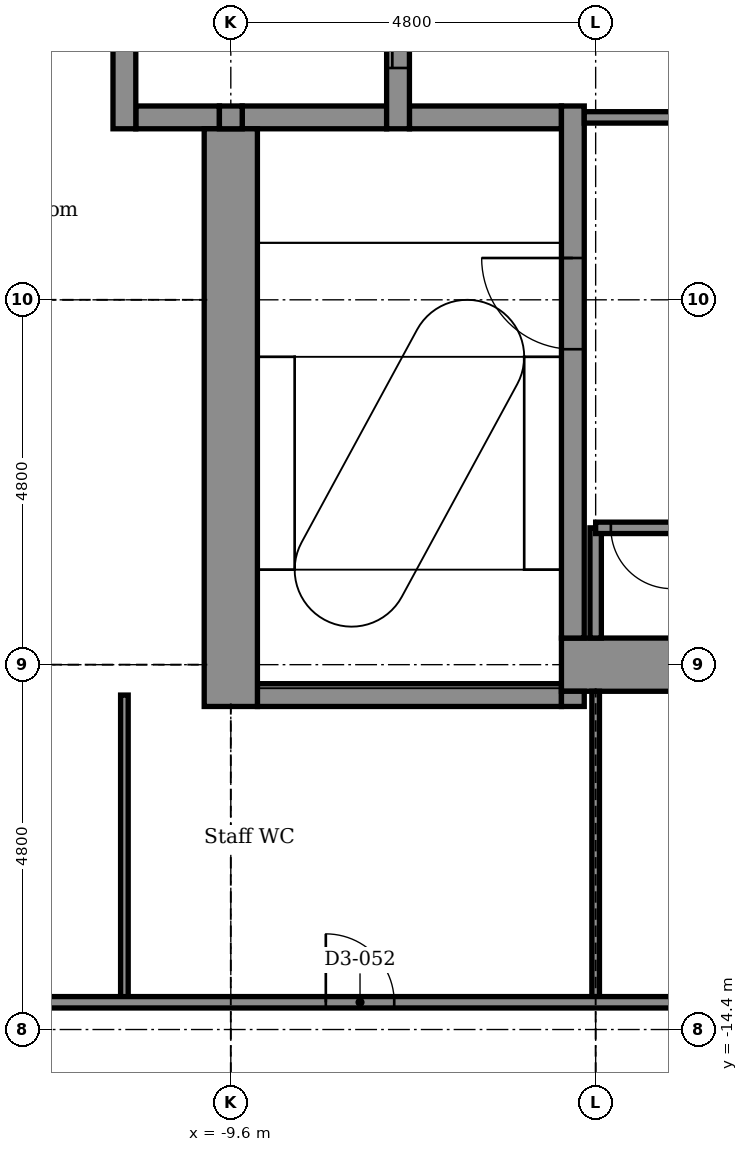
"""IFC4 building model, lengths in metres.
Left out: names, types, materials, properties, quantities, classifications, styles, units other than length and angle.
Written with IfcOpenShell. Run it as: python <this file> out.ifc"""

import sys

from ifc_helpers import new_model, si_unit, direction, frame, frame_2d, origin, place, context, subcontext, project, spatial, rectangle, extrude, element, fill, save


model = new_model("IFC4")
c1 = context("Model", 3, precision=1e-05, world=origin(), true_north=direction((0.0, 1.0)))
c2 = subcontext(c1, "Body", "Model", "MODEL_VIEW")
j1 = project(units=[si_unit("LENGTHUNIT", "METRE"), si_unit("PLANEANGLEUNIT", "RADIAN")], contexts=[c1])
p1 = place(None, origin())
s1 = spatial("IfcSite", under=j1, at=p1, CompositionType="ELEMENT")
p2 = place(p1, origin())
s2 = spatial("IfcBuilding", under=s1, at=p2, CompositionType="ELEMENT")
p3 = place(p2, frame((0.0, 0.0, 170.0)))
s3 = spatial("IfcBuildingStorey", under=s2, at=p3, CompositionType="ELEMENT", Elevation=170.0)
p4 = place(p3, frame((-9.25, -10.0, -0.15), z_axis=(0.0, 0.0, 1.0), x_axis=(1.0, 0.0, 0.0)))
e1 = element("IfcWall", 1, at=p4, inside=s3, PredefinedType="STANDARD", context=c2, shape_type="SweptSolid", body=[
    extrude(rectangle(XDim=4.0, YDim=0.3, at=frame_2d((2.0, 0.0))), origin(), (0.0, 0.0, 1.0), 3.9),
])
p5 = place(p3, frame((-5.25, -9.6, -0.15), z_axis=(0.0, 0.0, 1.0), x_axis=(1.0, 0.0, 0.0)))
e2 = element("IfcWall", 2, at=p5, inside=s3, PredefinedType="SHEAR", context=c2, shape_type="SweptSolid", body=[
    extrude(rectangle(XDim=10.2, YDim=0.7, at=frame_2d((5.1, 0.0))), origin(), (0.0, 0.0, 1.0), 3.9),
])
p6 = place(p5, frame((9.0, 0.0, 0.15)))
e3 = element("IfcOpeningElement", 3, at=p6, cuts=e2, PredefinedType="OPENING", context=c2, shape_type="SweptSolid", body=[
    extrude(rectangle(XDim=0.9, YDim=2.1, at=frame_2d((0.45, 1.05))), frame((0.0, 0.36, 0.0), z_axis=(0.0, -1.0, 0.0), x_axis=(1.0, 0.0, 0.0)), (0.0, 0.0, 1.0), 0.72),
])
p7 = place(p3, frame((-10.85, -2.4, -0.15), z_axis=(0.0, 0.0, 1.0), x_axis=(1.0, 0.0, 0.0)))
e4 = element("IfcWall", 4, at=p7, inside=s3, PredefinedType="STANDARD", context=c2, shape_type="SweptSolid", body=[
    extrude(rectangle(XDim=1.1, YDim=0.3, at=frame_2d((0.55, 0.0))), origin(), (0.0, 0.0, 1.0), 3.9),
])
p8 = place(p3, frame((-9.45, -2.4, -0.15), z_axis=(0.0, 0.0, 1.0), x_axis=(1.0, 0.0, 0.0)))
e5 = element("IfcWall", 5, at=p8, inside=s3, PredefinedType="STANDARD", context=c2, shape_type="SweptSolid", body=[
    extrude(rectangle(XDim=1.9, YDim=0.3, at=frame_2d((0.95, 0.0))), origin(), (0.0, 0.0, 1.0), 3.9),
])
p9 = place(p3, frame((-7.25, -2.4, -0.15), z_axis=(0.0, 0.0, 1.0), x_axis=(1.0, 0.0, 0.0)))
e6 = element("IfcWall", 6, at=p9, inside=s3, PredefinedType="STANDARD", context=c2, shape_type="SweptSolid", body=[
    extrude(rectangle(XDim=2.0, YDim=0.3, at=frame_2d((1.0, 0.0))), origin(), (0.0, 0.0, 1.0), 3.9),
])
p10 = place(p3, frame((-11.0, -2.55, -0.15), z_axis=(0.0, 0.0, 1.0), x_axis=(0.0, 1.0, 0.0)))
e7 = element("IfcWall", 7, at=p10, inside=s3, PredefinedType="STANDARD", context=c2, shape_type="SweptSolid", body=[
    extrude(rectangle(XDim=5.1, YDim=0.3, at=frame_2d((2.55, 0.0))), origin(), (0.0, 0.0, 1.0), 3.9),
])
p11 = place(p3, frame((-9.6, -10.15, -0.15), z_axis=(0.0, 0.0, 1.0), x_axis=(0.0, 1.0, 0.0)))
e8 = element("IfcWall", 8, at=p11, inside=s3, PredefinedType="SHEAR", context=c2, shape_type="SweptSolid", body=[
    extrude(rectangle(XDim=7.6, YDim=0.7, at=frame_2d((3.8, 0.0))), origin(), (0.0, 0.0, 1.0), 3.9),
])
p12 = place(p3, frame((-9.6, -2.55, -0.15), z_axis=(0.0, 0.0, 1.0), x_axis=(0.0, 1.0, 0.0)))
e9 = element("IfcWall", 9, at=p12, inside=s3, PredefinedType="STANDARD", context=c2, shape_type="SweptSolid", body=[
    extrude(rectangle(XDim=0.3, YDim=0.3, at=frame_2d((0.15, 0.0))), origin(), (0.0, 0.0, 1.0), 3.9),
])
p13 = place(p3, frame((-7.4, -2.55, -0.15), z_axis=(0.0, 0.0, 1.0), x_axis=(0.0, 1.0, 0.0)))
e10 = element("IfcWall", 10, at=p13, inside=s3, PredefinedType="STANDARD", context=c2, shape_type="SweptSolid", body=[
    extrude(rectangle(XDim=5.1, YDim=0.3, at=frame_2d((2.55, 0.0))), origin(), (0.0, 0.0, 1.0), 3.9),
])
p14 = place(p13, frame((0.8, 0.0, 0.15)))
e11 = element("IfcOpeningElement", 11, at=p14, cuts=e10, PredefinedType="OPENING", context=c2, shape_type="SweptSolid", body=[
    extrude(rectangle(XDim=1.1, YDim=2.1, at=frame_2d((0.55, 1.05))), frame((0.0, 0.16, 0.0), z_axis=(0.0, -1.0, 0.0), x_axis=(1.0, 0.0, 0.0)), (0.0, 0.0, 1.0), 0.32),
])
p15 = place(p13, frame((3.2, 0.0, 0.15)))
e12 = element("IfcOpeningElement", 12, at=p15, cuts=e10, PredefinedType="OPENING", context=c2, shape_type="SweptSolid", body=[
    extrude(rectangle(XDim=1.1, YDim=2.1, at=frame_2d((0.55, 1.05))), frame((0.0, 0.16, 0.0), z_axis=(0.0, -1.0, 0.0), x_axis=(1.0, 0.0, 0.0)), (0.0, 0.0, 1.0), 0.32),
])
p16 = place(p3, frame((-5.1, -10.15, -0.15), z_axis=(0.0, 0.0, 1.0), x_axis=(0.0, 1.0, 0.0)))
e13 = element("IfcWall", 13, at=p16, inside=s3, PredefinedType="STANDARD", context=c2, shape_type="SweptSolid", body=[
    extrude(rectangle(XDim=0.2, YDim=0.3, at=frame_2d((0.1, 0.0))), origin(), (0.0, 0.0, 1.0), 3.9),
])
p17 = place(p3, frame((-5.1, -9.25, -0.15), z_axis=(0.0, 0.0, 1.0), x_axis=(0.0, 1.0, 0.0)))
e14 = element("IfcWall", 14, at=p17, inside=s3, PredefinedType="STANDARD", context=c2, shape_type="SweptSolid", body=[
    extrude(rectangle(XDim=7.0, YDim=0.3, at=frame_2d((3.5, 0.0))), origin(), (0.0, 0.0, 1.0), 3.9),
])
p18 = place(p17, frame((3.8, 0.0, 0.15)))
e15 = element("IfcOpeningElement", 15, at=p18, cuts=e14, PredefinedType="OPENING", context=c2, shape_type="SweptSolid", body=[
    extrude(rectangle(XDim=1.2, YDim=2.1, at=frame_2d((0.6, 1.05))), frame((0.0, 0.16, 0.0), z_axis=(0.0, -1.0, 0.0), x_axis=(1.0, 0.0, 0.0)), (0.0, 0.0, 1.0), 0.32),
])
p19 = place(p3, frame((-4.8, -14.042, 0.0), z_axis=(0.0, 0.0, 1.0), x_axis=(0.0, 1.0, 0.0)))
e16 = element("IfcWall", 16, at=p19, inside=s3, PredefinedType="PARTITIONING", context=c2, shape_type="SweptSolid", body=[
    extrude(rectangle(XDim=4.092, YDim=0.1, at=frame_2d((2.046, 0.0))), origin(), (0.0, 0.0, 1.0), 3.066),
])
p20 = place(p3, frame((-4.8, -9.25, 0.0), z_axis=(0.0, 0.0, 1.0), x_axis=(0.0, 1.0, 0.0)))
e17 = element("IfcWall", 17, at=p20, inside=s3, PredefinedType="PARTITIONING", context=c2, shape_type="SweptSolid", body=[
    extrude(rectangle(XDim=1.45, YDim=0.15, at=frame_2d((0.725, 0.0))), origin(), (0.0, 0.0, 1.0), 3.75),
])
p21 = place(p3, frame((-11.0, -14.042, 0.0), z_axis=(0.0, 0.0, 1.0), x_axis=(0.0, 1.0, 0.0)))
e18 = element("IfcWall", 18, at=p21, inside=s3, PredefinedType="PARTITIONING", context=c2, shape_type="SweptSolid", body=[
    extrude(rectangle(XDim=4.042, YDim=0.1, at=frame_2d((2.021, 0.0))), origin(), (0.0, 0.0, 1.0), 3.75),
])
p22 = place(p3, frame((-17.021, -14.042, 0.0), z_axis=(0.0, 0.0, 1.0), x_axis=(1.0, 0.0, 0.0)))
e19 = element("IfcWall", 19, at=p22, inside=s3, PredefinedType="PARTITIONING", context=c2, shape_type="SweptSolid", body=[
    extrude(rectangle(XDim=20.621, YDim=0.15, at=frame_2d((10.311, 0.0))), origin(), (0.0, 0.0, 1.0), 3.75),
])
p23 = place(p22, frame((8.671, 0.0, 0.0)))
e20 = element("IfcOpeningElement", 20, at=p23, cuts=e19, PredefinedType="OPENING", context=c2, shape_type="SweptSolid", body=[
    extrude(rectangle(XDim=0.9, YDim=2.1, at=frame_2d((0.45, 1.05))), frame((0.0, 0.085, 0.0), z_axis=(0.0, -1.0, 0.0), x_axis=(1.0, 0.0, 0.0)), (0.0, 0.0, 1.0), 0.17),
])
p24 = place(p22, frame((14.171, 0.0, 0.0)))
e21 = element("IfcOpeningElement", 21, at=p24, cuts=e19, PredefinedType="OPENING", context=c2, shape_type="SweptSolid", body=[
    extrude(rectangle(XDim=0.9, YDim=2.1, at=frame_2d((0.45, 1.05))), frame((0.0, 0.085, 0.0), z_axis=(0.0, -1.0, 0.0), x_axis=(1.0, 0.0, 0.0)), (0.0, 0.0, 1.0), 0.17),
])
p25 = place(p3, frame((-4.8, -7.8, 0.0), z_axis=(0.0, 0.0, 1.0), x_axis=(1.0, 0.0, 0.0)))
e22 = element("IfcWall", 22, at=p25, inside=s3, PredefinedType="PARTITIONING", context=c2, shape_type="SweptSolid", body=[
    extrude(rectangle(XDim=1.05, YDim=0.15, at=frame_2d((0.525, 0.0))), origin(), (0.0, 0.0, 1.0), 3.75),
])
p26 = place(p25, frame((0.2, 0.0, 0.0)))
e23 = element("IfcOpeningElement", 23, at=p26, cuts=e22, PredefinedType="OPENING", context=c2, shape_type="SweptSolid", body=[
    extrude(rectangle(XDim=0.8, YDim=2.1, at=frame_2d((0.4, 1.05))), frame((0.0, 0.085, 0.0), z_axis=(0.0, -1.0, 0.0), x_axis=(1.0, 0.0, 0.0)), (0.0, 0.0, 1.0), 0.17),
])
p27 = place(p3, frame((-4.95, -2.4, 0.0), z_axis=(0.0, 0.0, 1.0), x_axis=(1.0, 0.0, 0.0)))
e24 = element("IfcWall", 24, at=p27, inside=s3, PredefinedType="PARTITIONING", context=c2, shape_type="SweptSolid", body=[
    extrude(rectangle(XDim=1.2, YDim=0.15, at=frame_2d((0.6, 0.0))), origin(), (0.0, 0.0, 1.0), 3.75),
])
p28 = place(p26, frame((0.8, 0.0, 0.0), z_axis=(0.0, 0.0, 1.0), x_axis=(-1.0, 0.0, 0.0)))
e25 = element("IfcDoor", 25, at=p28, inside=s3, OperationType="SINGLE_SWING_RIGHT", PredefinedType="DOOR", context=c2, shape_type="SweptSolid", body=[
    extrude(rectangle(XDim=0.8, YDim=2.1, at=frame_2d((0.4, 1.05))), frame((0.0, 0.025, 0.0), z_axis=(0.0, -1.0, 0.0), x_axis=(1.0, 0.0, 0.0)), (0.0, 0.0, 1.0), 0.05),
])
fill(e23, e25)
p29 = place(p23, origin())
e26 = element("IfcDoor", 26, at=p29, inside=s3, OperationType="SINGLE_SWING_LEFT", PredefinedType="DOOR", context=c2, shape_type="SweptSolid", body=[
    extrude(rectangle(XDim=0.9, YDim=2.1, at=frame_2d((0.45, 1.05))), frame((0.0, 0.025, 0.0), z_axis=(0.0, -1.0, 0.0), x_axis=(1.0, 0.0, 0.0)), (0.0, 0.0, 1.0), 0.05),
])
fill(e20, e26)
p30 = place(p14, origin())
e27 = element("IfcDoor", 27, at=p30, inside=s3, OperationType="DOUBLE_DOOR_SLIDING", PredefinedType="DOOR", context=c2, shape_type="SweptSolid", body=[
    extrude(rectangle(XDim=1.1, YDim=2.1, at=frame_2d((0.55, 1.05))), frame((0.0, 0.025, 0.0), z_axis=(0.0, -1.0, 0.0), x_axis=(1.0, 0.0, 0.0)), (0.0, 0.0, 1.0), 0.05),
])
fill(e11, e27)
p31 = place(p18, origin())
e28 = element("IfcDoor", 28, at=p31, inside=s3, OperationType="SINGLE_SWING_RIGHT", PredefinedType="DOOR", context=c2, shape_type="SweptSolid", body=[
    extrude(rectangle(XDim=1.2, YDim=2.1, at=frame_2d((0.6, 1.05))), frame((0.0, 0.025, 0.0), z_axis=(0.0, -1.0, 0.0), x_axis=(1.0, 0.0, 0.0)), (0.0, 0.0, 1.0), 0.05),
])
fill(e15, e28)
save(model, sys.argv[1])
